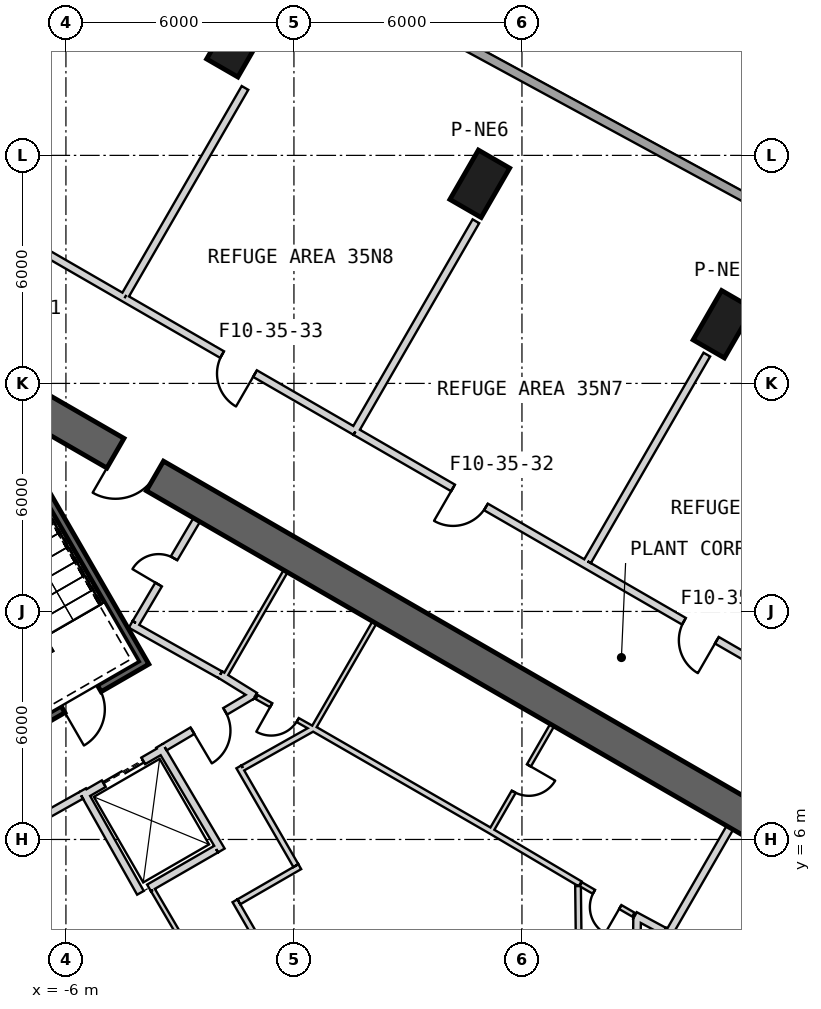
"""IFC4 building model, lengths in metres.
Left out: names, types, materials, properties, quantities, classifications, styles, units other than length and angle.
Written with IfcOpenShell. Run it as: python <this file> out.ifc"""

import sys

from ifc_helpers import new_model, si_unit, direction, frame, frame_2d, origin, origin_2d, place, context, subcontext, project, spatial, rectangle, extrude, element, fill, save


model = new_model("IFC4")
c1 = context("Model", 3, precision=1e-05, world=origin(), true_north=direction((0.0, 1.0)))
c2 = subcontext(c1, "Body", "Model", "MODEL_VIEW")
j1 = project(units=[si_unit("LENGTHUNIT", "METRE"), si_unit("PLANEANGLEUNIT", "RADIAN")], contexts=[c1])
p1 = place(None, origin())
s1 = spatial("IfcSite", under=j1, at=p1, CompositionType="ELEMENT")
p2 = place(p1, origin())
s2 = spatial("IfcBuilding", under=s1, at=p2, CompositionType="ELEMENT")
p3 = place(p2, frame((0.0, 0.0, 163.2)))
s3 = spatial("IfcBuildingStorey", under=s2, at=p3, CompositionType="ELEMENT", Elevation=163.2)
for number, where, z_axis, x_axis in (
    (1, (11.291, 19.557, 0.0), (0.0, 0.0, 1.0), (0.5, 0.866, 0.0)),
    (2, (4.89, 23.253, 0.0), (0.0, 0.0, 1.0), (0.5, 0.866, 0.0)),
    (3, (-1.511, 26.948, 0.0), (0.0, 0.0, 1.0), (0.5, 0.866, 0.0)),
):
    element("IfcColumn", number, at=place(p3, frame(where, z_axis=z_axis, x_axis=x_axis)), inside=s3, PredefinedType="COLUMN", context=c2, shape_type="SweptSolid", body=[
        extrude(rectangle(XDim=1.5, YDim=0.95, at=origin_2d()), origin(), (0.0, 0.0, 1.0), 5.7),
    ])
p4 = place(p3, frame((19.475, 2.208, 0.0), z_axis=(0.0, 0.0, 1.0), x_axis=(-0.866028369851, 0.499994862586, 0.0)))
e4 = element("IfcWall", 4, at=p4, inside=s3, PredefinedType="SHEAR", context=c2, shape_type="SweptSolid", body=[
    extrude(rectangle(XDim=31.523, YDim=0.9, at=frame_2d((15.762, 0.0))), origin(), (0.0, 0.0, 1.0), 6.0),
])
p5 = place(p4, frame((3.612, 0.0, 0.0)))
e5 = element("IfcOpeningElement", 5, at=p5, cuts=e4, PredefinedType="OPENING", context=c2, shape_type="SweptSolid", body=[
    extrude(rectangle(XDim=1.2, YDim=2.4, at=frame_2d((0.6, 1.2))), frame((0.0, 0.46, 0.0), z_axis=(0.0, -1.0, 0.0), x_axis=(1.0, 0.0, 0.0)), (0.0, 0.0, 1.0), 0.92),
])
p6 = place(p4, frame((26.712, 0.0, 0.0)))
e6 = element("IfcOpeningElement", 6, at=p6, cuts=e4, PredefinedType="OPENING", context=c2, shape_type="SweptSolid", body=[
    extrude(rectangle(XDim=1.2, YDim=2.4, at=frame_2d((0.6, 1.2))), frame((0.0, 0.46, 0.0), z_axis=(0.0, -1.0, 0.0), x_axis=(1.0, 0.0, 0.0)), (0.0, 0.0, 1.0), 0.92),
])
p7 = place(p3, frame((29.693, 13.206, 0.0), z_axis=(0.0, 0.0, 1.0), x_axis=(-0.878694903116, 0.477383773539, 0.0)))
e7 = element("IfcWall", 7, at=p7, inside=s3, PredefinedType="SOLIDWALL", context=c2, shape_type="SweptSolid", body=[
    extrude(rectangle(XDim=38.239, YDim=0.24, at=frame_2d((19.12, 0.0))), origin(), (0.0, 0.0, 1.0), 5.7),
])
p8 = place(p3, frame((9.847, 3.495, 0.0), z_axis=(0.0, 0.0, 1.0), x_axis=(0.499984717929, 0.866034226713, 0.0)))
e8 = element("IfcWall", 8, at=p8, inside=s3, PredefinedType="PLUMBINGWALL", context=c2, shape_type="SweptSolid", body=[
    extrude(rectangle(XDim=3.25, YDim=0.2, at=frame_2d((1.625, 0.0))), origin(), (0.0, 0.0, 1.0), 5.7),
])
p9 = place(p3, frame((12.073, 2.211, 0.0), z_axis=(0.0, 0.0, 1.0), x_axis=(-0.860414880418, 0.509594185166, 0.0)))
e9 = element("IfcWall", 9, at=p9, inside=s3, PredefinedType="PLUMBINGWALL", context=c2, shape_type="SweptSolid", body=[
    extrude(rectangle(XDim=2.7, YDim=0.2, at=frame_2d((1.35, 0.0))), origin(), (0.0, 0.0, 1.0), 5.7),
])
p10 = place(p3, frame((-7.854, 17.405, -0.35), z_axis=(0.0, 0.0, 1.0), x_axis=(0.499997992926, -0.866026562566, 0.0)))
e10 = element("IfcWall", 10, at=p10, inside=s3, PredefinedType="SHEAR", context=c2, shape_type="SweptSolid", body=[
    extrude(rectangle(XDim=7.9, YDim=0.2, at=frame_2d((3.95, 0.0))), origin(), (0.0, 0.0, 1.0), 6.05),
])
p11 = place(p3, frame((-7.159, 8.8, -0.35), z_axis=(0.0, 0.0, 1.0), x_axis=(0.866047807691, 0.499961193289, 0.0)))
e11 = element("IfcWall", 11, at=p11, inside=s3, PredefinedType="SHEAR", context=c2, shape_type="SweptSolid", body=[
    extrude(rectangle(XDim=3.6, YDim=0.2, at=frame_2d((1.8, 0.0))), origin(), (0.0, 0.0, 1.0), 6.05),
])
p12 = place(p11, frame((1.25, 0.0, 0.35)))
e12 = element("IfcOpeningElement", 12, at=p12, cuts=e11, PredefinedType="OPENING", context=c2, shape_type="SweptSolid", body=[
    extrude(rectangle(XDim=1.1, YDim=2.1, at=frame_2d((0.55, 1.05))), frame((0.0, 0.11, 0.0), z_axis=(0.0, -1.0, 0.0), x_axis=(1.0, 0.0, 0.0)), (0.0, 0.0, 1.0), 0.22),
])
p13 = place(p3, frame((-5.524, 7.168, 0.0), z_axis=(0.0, 0.0, 1.0), x_axis=(0.866024647952, 0.500001309137, 0.0)))
e13 = element("IfcWall", 13, at=p13, inside=s3, PredefinedType="PLUMBINGWALL", context=c2, shape_type="SweptSolid", body=[
    extrude(rectangle(XDim=2.4, YDim=0.2, at=frame_2d((1.2, 0.0))), origin(), (0.0, 0.0, 1.0), 5.7),
])
p14 = place(p13, frame((0.6, 0.0, 0.0)))
e14 = element("IfcOpeningElement", 14, at=p14, cuts=e13, PredefinedType="OPENING", context=c2, shape_type="SweptSolid", body=[
    extrude(rectangle(XDim=1.2, YDim=2.4, at=frame_2d((0.6, 1.2))), frame((0.0, 0.11, 0.0), z_axis=(0.0, -1.0, 0.0), x_axis=(1.0, 0.0, 0.0)), (0.0, 0.0, 1.0), 0.22),
])
p15 = place(p3, frame((-4.039, 4.596, 0.0), z_axis=(0.0, 0.0, 1.0), x_axis=(-0.491322718731, 0.870977603649, 0.0)))
e15 = element("IfcWall", 15, at=p15, inside=s3, PredefinedType="PLUMBINGWALL", context=c2, shape_type="SweptSolid", body=[
    extrude(rectangle(XDim=3.1, YDim=0.2, at=frame_2d((1.55, 0.0))), origin(), (0.0, 0.0, 1.0), 5.7),
])
p16 = place(p3, frame((-3.538, 8.465, 0.0), z_axis=(0.0, 0.0, 1.0), x_axis=(0.508616218331, -0.860993346345, 0.0)))
e16 = element("IfcWall", 16, at=p16, inside=s3, PredefinedType="PLUMBINGWALL", context=c2, shape_type="SweptSolid", body=[
    extrude(rectangle(XDim=3.2, YDim=0.2, at=frame_2d((1.6, 0.0))), origin(), (0.0, 0.0, 1.0), 5.7),
])
p17 = place(p3, frame((-2.047, 5.746, 0.0), z_axis=(0.0, 0.0, 1.0), x_axis=(-0.866032100247, -0.499988401207, 0.0)))
e17 = element("IfcWall", 17, at=p17, inside=s3, PredefinedType="PLUMBINGWALL", context=c2, shape_type="SweptSolid", body=[
    extrude(rectangle(XDim=2.04, YDim=0.2, at=frame_2d((1.02, 0.0))), origin(), (0.0, 0.0, 1.0), 5.7),
])
p18 = place(p3, frame((6.795, 9.01, 0.0), z_axis=(0.0, 0.0, 1.0), x_axis=(-0.499984717929, -0.866034226713, 0.0)))
e18 = element("IfcWall", 18, at=p18, inside=s3, PredefinedType="PARTITIONING", context=c2, shape_type="SweptSolid", body=[
    extrude(rectangle(XDim=3.25, YDim=0.12, at=frame_2d((1.625, 0.0))), origin(), (0.0, 0.0, 1.0), 5.7),
])
p19 = place(p18, frame((1.225, 0.0, 0.0)))
e19 = element("IfcOpeningElement", 19, at=p19, cuts=e18, PredefinedType="OPENING", context=c2, shape_type="SweptSolid", body=[
    extrude(rectangle(XDim=0.8, YDim=2.1, at=frame_2d((0.4, 1.05))), frame((0.0, 0.07, 0.0), z_axis=(0.0, -1.0, 0.0), x_axis=(1.0, 0.0, 0.0)), (0.0, 0.0, 1.0), 0.14),
])
p20 = place(p3, frame((8.974, 3.999, 0.0), z_axis=(0.0, 0.0, 1.0), x_axis=(0.880917147855, -0.473270513147, 0.0)))
e20 = element("IfcWall", 20, at=p20, inside=s3, PredefinedType="PARTITIONING", context=c2, shape_type="SweptSolid", body=[
    extrude(rectangle(XDim=0.878, YDim=0.2, at=frame_2d((0.439, 0.0))), origin(), (0.0, 0.0, 1.0), 5.7),
])
p21 = place(p3, frame((7.53, 4.833, 0.0), z_axis=(0.0, 0.0, 1.0), x_axis=(-0.860550523279, 0.509365091938, 0.0)))
e21 = element("IfcWall", 21, at=p21, inside=s3, PredefinedType="PLUMBINGWALL", context=c2, shape_type="SweptSolid", body=[
    extrude(rectangle(XDim=2.755, YDim=0.15, at=frame_2d((1.377, 0.0))), origin(), (0.0, 0.0, 1.0), 5.7),
])
p22 = place(p3, frame((7.55, 4.821, 0.0), z_axis=(0.0, 0.0, 1.0), x_axis=(0.866019818373, -0.500009674092, 0.0)))
e22 = element("IfcWall", 22, at=p22, inside=s3, PredefinedType="PARTITIONING", context=c2, shape_type="SweptSolid", body=[
    extrude(rectangle(XDim=1.594, YDim=0.12, at=frame_2d((0.797, 0.0))), origin(), (0.0, 0.0, 1.0), 5.7),
])
p23 = place(p22, frame((0.397, 0.0, 0.0)))
e23 = element("IfcOpeningElement", 23, at=p23, cuts=e22, PredefinedType="OPENING", context=c2, shape_type="SweptSolid", body=[
    extrude(rectangle(XDim=0.8, YDim=2.1, at=frame_2d((0.4, 1.05))), frame((0.0, 0.07, 0.0), z_axis=(0.0, -1.0, 0.0), x_axis=(1.0, 0.0, 0.0)), (0.0, 0.0, 1.0), 0.14),
])
p24 = place(p3, frame((2.119, 11.709, 0.0), z_axis=(0.0, 0.0, 1.0), x_axis=(-0.500017246033, -0.866015446554, 0.0)))
e24 = element("IfcWall", 24, at=p24, inside=s3, PredefinedType="PARTITIONING", context=c2, shape_type="SweptSolid", body=[
    extrude(rectangle(XDim=3.25, YDim=0.12, at=frame_2d((1.625, 0.0))), origin(), (0.0, 0.0, 1.0), 5.7),
])
p25 = place(p3, frame((5.159, 6.236, 0.0), z_axis=(0.0, 0.0, 1.0), x_axis=(-0.866028230842, 0.499995103361, 0.0)))
e25 = element("IfcWall", 25, at=p25, inside=s3, PredefinedType="PLUMBINGWALL", context=c2, shape_type="SweptSolid", body=[
    extrude(rectangle(XDim=5.4, YDim=0.15, at=frame_2d((2.7, 0.0))), origin(), (0.0, 0.0, 1.0), 5.7),
])
p26 = place(p3, frame((-0.22, 13.06, 0.0), z_axis=(0.0, 0.0, 1.0), x_axis=(-0.499984717929, -0.866034226713, 0.0)))
e26 = element("IfcWall", 26, at=p26, inside=s3, PredefinedType="PARTITIONING", context=c2, shape_type="SweptSolid", body=[
    extrude(rectangle(XDim=3.25, YDim=0.12, at=frame_2d((1.625, 0.0))), origin(), (0.0, 0.0, 1.0), 5.7),
])
p27 = place(p3, frame((-1.941, 10.339, 0.0), z_axis=(0.0, 0.0, 1.0), x_axis=(0.850216889117, -0.526432561171, 0.0)))
e27 = element("IfcWall", 27, at=p27, inside=s3, PredefinedType="PARTITIONING", context=c2, shape_type="SweptSolid", body=[
    extrude(rectangle(XDim=1.078, YDim=0.2, at=frame_2d((0.539, 0.0))), origin(), (0.0, 0.0, 1.0), 5.7),
])
p28 = place(p3, frame((-0.979, 9.747, 0.0), z_axis=(0.0, 0.0, 1.0), x_axis=(0.871957532922, -0.489581515972, 0.0)))
e28 = element("IfcWall", 28, at=p28, inside=s3, PredefinedType="PARTITIONING", context=c2, shape_type="SweptSolid", body=[
    extrude(rectangle(XDim=1.672, YDim=0.12, at=frame_2d((0.836, 0.0))), origin(), (0.0, 0.0, 1.0), 5.7),
])
p29 = place(p28, frame((0.436, 0.0, 0.0)))
e29 = element("IfcOpeningElement", 29, at=p29, cuts=e28, PredefinedType="OPENING", context=c2, shape_type="SweptSolid", body=[
    extrude(rectangle(XDim=0.8, YDim=2.1, at=frame_2d((0.4, 1.05))), frame((0.0, 0.07, 0.0), z_axis=(0.0, -1.0, 0.0), x_axis=(1.0, 0.0, 0.0)), (0.0, 0.0, 1.0), 0.14),
])
p30 = place(p3, frame((-4.296, 11.659, 0.0), z_axis=(0.0, 0.0, 1.0), x_axis=(0.871534483978, -0.490334215854, 0.0)))
e30 = element("IfcWall", 30, at=p30, inside=s3, PredefinedType="PARTITIONING", context=c2, shape_type="SweptSolid", body=[
    extrude(rectangle(XDim=2.7, YDim=0.2, at=frame_2d((1.35, 0.0))), origin(), (0.0, 0.0, 1.0), 5.7),
])
p31 = place(p3, frame((-2.558, 14.409, 0.0), z_axis=(0.0, 0.0, 1.0), x_axis=(-0.508018930956, -0.861345903683, 0.0)))
e31 = element("IfcWall", 31, at=p31, inside=s3, PredefinedType="PARTITIONING", context=c2, shape_type="SweptSolid", body=[
    extrude(rectangle(XDim=3.15, YDim=0.2, at=frame_2d((1.575, 0.0))), origin(), (0.0, 0.0, 1.0), 5.7),
])
p32 = place(p31, frame((1.175, 0.0, 0.0)))
e32 = element("IfcOpeningElement", 32, at=p32, cuts=e31, PredefinedType="OPENING", context=c2, shape_type="SweptSolid", body=[
    extrude(rectangle(XDim=0.8, YDim=2.1, at=frame_2d((0.4, 1.05))), frame((0.0, 0.11, 0.0), z_axis=(0.0, -1.0, 0.0), x_axis=(1.0, 0.0, 0.0)), (0.0, 0.0, 1.0), 0.22),
])
p33 = place(p3, frame((9.001, 1.27, 0.0), z_axis=(0.0, 0.0, 1.0), x_axis=(0.010723968736, 0.999942496594, 0.0)))
e33 = element("IfcWall", 33, at=p33, inside=s3, PredefinedType="PARTITIONING", context=c2, shape_type="SweptSolid", body=[
    extrude(rectangle(XDim=2.709, YDim=0.2, at=frame_2d((1.354, 0.0))), origin(), (0.0, 0.0, 1.0), 5.7),
])
p34 = place(p33, frame((0.848, 0.0, 0.0)))
e34 = element("IfcOpeningElement", 34, at=p34, cuts=e33, PredefinedType="OPENING", context=c2, shape_type="SweptSolid", body=[
    extrude(rectangle(XDim=1.0, YDim=2.1, at=frame_2d((0.5, 1.05))), frame((0.0, 0.11, 0.0), z_axis=(0.0, -1.0, 0.0), x_axis=(1.0, 0.0, 0.0)), (0.0, 0.0, 1.0), 0.22),
])
p35 = place(p3, frame((-5.6, 7.16, 0.0), z_axis=(0.0, 0.0, 1.0), x_axis=(-0.871340486379, -0.490678873396, 0.0)))
e35 = element("IfcWall", 35, at=p35, inside=s3, PredefinedType="PARTITIONING", context=c2, shape_type="SweptSolid", body=[
    extrude(rectangle(XDim=2.581, YDim=0.2, at=frame_2d((1.291, 0.0))), origin(), (0.0, 0.0, 1.0), 5.7),
])
p36 = place(p3, frame((-1.07, 9.809, 0.0), z_axis=(0.0, 0.0, 1.0), x_axis=(-0.860603293832, -0.509275927808, 0.0)))
e36 = element("IfcWall", 36, at=p36, inside=s3, PredefinedType="PARTITIONING", context=c2, shape_type="SweptSolid", body=[
    extrude(rectangle(XDim=2.708, YDim=0.2, at=frame_2d((1.354, 0.0))), origin(), (0.0, 0.0, 1.0), 5.7),
])
p37 = place(p36, frame((0.86, 0.0, 0.0)))
e37 = element("IfcOpeningElement", 37, at=p37, cuts=e36, PredefinedType="OPENING", context=c2, shape_type="SweptSolid", body=[
    extrude(rectangle(XDim=1.0, YDim=2.1, at=frame_2d((0.5, 1.05))), frame((0.0, 0.11, 0.0), z_axis=(0.0, -1.0, 0.0), x_axis=(1.0, 0.0, 0.0)), (0.0, 0.0, 1.0), 0.22),
])
p38 = place(p3, frame((-1.42, 0.762, 0.0), z_axis=(0.0, 0.0, 1.0), x_axis=(-0.505655878767, 0.862735261983, 0.0)))
e38 = element("IfcWall", 38, at=p38, inside=s3, PredefinedType="PARTITIONING", context=c2, shape_type="SweptSolid", body=[
    extrude(rectangle(XDim=4.53, YDim=0.12, at=frame_2d((2.265, 0.0))), origin(), (0.0, 0.0, 1.0), 5.7),
])
p39 = place(p38, frame((1.916, 0.0, 0.0)))
e39 = element("IfcOpeningElement", 39, at=p39, cuts=e38, PredefinedType="OPENING", context=c2, shape_type="SweptSolid", body=[
    extrude(rectangle(XDim=0.8, YDim=2.1, at=frame_2d((0.4, 1.05))), frame((0.0, 0.07, 0.0), z_axis=(0.0, -1.0, 0.0), x_axis=(1.0, 0.0, 0.0)), (0.0, 0.0, 1.0), 0.14),
])
p40 = place(p3, frame((7.501, 2.625, 0.0), z_axis=(0.0, 0.0, 1.0), x_axis=(-0.011799927307, 0.999930378434, 0.0)))
e40 = element("IfcWall", 40, at=p40, inside=s3, PredefinedType="PLUMBINGWALL", context=c2, shape_type="SweptSolid", body=[
    extrude(rectangle(XDim=2.152, YDim=0.15, at=frame_2d((1.076, 0.0))), origin(), (0.0, 0.0, 1.0), 5.7),
])
p41 = place(p3, frame((-1.551, 4.387, 0.0), z_axis=(0.0, 0.0, 1.0), x_axis=(0.499976393034, -0.866039032844, 0.0)))
e41 = element("IfcWall", 41, at=p41, inside=s3, PredefinedType="PLUMBINGWALL", context=c2, shape_type="SweptSolid", body=[
    extrude(rectangle(XDim=3.079, YDim=0.15, at=frame_2d((1.54, 0.0))), origin(), (0.0, 0.0, 1.0), 5.7),
])
p42 = place(p41, frame((1.177, 0.0, 0.0)))
e42 = element("IfcOpeningElement", 42, at=p42, cuts=e41, PredefinedType="OPENING", context=c2, shape_type="SweptSolid", body=[
    extrude(rectangle(XDim=0.8, YDim=2.1, at=frame_2d((0.4, 1.05))), frame((0.0, 0.085, 0.0), z_axis=(0.0, -1.0, 0.0), x_axis=(1.0, 0.0, 0.0)), (0.0, 0.0, 1.0), 0.17),
])
p43 = place(p3, frame((0.153, 5.285, 0.0), z_axis=(0.0, 0.0, 1.0), x_axis=(-0.866033964044, -0.499985172903, 0.0)))
e43 = element("IfcWall", 43, at=p43, inside=s3, PredefinedType="PLUMBINGWALL", context=c2, shape_type="SweptSolid", body=[
    extrude(rectangle(XDim=1.85, YDim=0.15, at=frame_2d((0.925, 0.0))), origin(), (0.0, 0.0, 1.0), 5.7),
])
p44 = place(p3, frame((-1.449, 7.91, 0.0), z_axis=(0.0, 0.0, 1.0), x_axis=(0.499990139034, -0.866031096941, 0.0)))
e44 = element("IfcWall", 44, at=p44, inside=s3, PredefinedType="PLUMBINGWALL", context=c2, shape_type="SweptSolid", body=[
    extrude(rectangle(XDim=3.0, YDim=0.15, at=frame_2d((1.5, 0.0))), origin(), (0.0, 0.0, 1.0), 5.7),
])
p45 = place(p3, frame((0.475, 8.905, 0.0), z_axis=(0.0, 0.0, 1.0), x_axis=(-0.871843752163, -0.489784107353, 0.0)))
e45 = element("IfcWall", 45, at=p45, inside=s3, PredefinedType="PLUMBINGWALL", context=c2, shape_type="SweptSolid", body=[
    extrude(rectangle(XDim=2.09, YDim=0.15, at=frame_2d((1.045, 0.0))), origin(), (0.0, 0.0, 1.0), 5.7),
])
p46 = place(p3, frame((13.77, 9.717, 0.0), z_axis=(0.0, 0.0, 1.0), x_axis=(-0.866024793964, 0.500001056239, 0.0)))
e46 = element("IfcWall", 46, at=p46, inside=s3, PredefinedType="PARTITIONING", context=c2, shape_type="SweptSolid", body=[
    extrude(rectangle(XDim=14.033, YDim=0.2, at=frame_2d((7.017, 0.0))), origin(), (0.0, 0.0, 1.0), 4.98),
])
p47 = place(p46, frame((3.05, 0.0, 0.0)))
e47 = element("IfcOpeningElement", 47, at=p47, cuts=e46, PredefinedType="OPENING", context=c2, shape_type="SweptSolid", body=[
    extrude(rectangle(XDim=1.0, YDim=2.1, at=frame_2d((0.5, 1.05))), frame((0.0, 0.11, 0.0), z_axis=(0.0, -1.0, 0.0), x_axis=(1.0, 0.0, 0.0)), (0.0, 0.0, 1.0), 0.22),
])
p48 = place(p46, frame((10.067, 0.0, 0.0)))
e48 = element("IfcOpeningElement", 48, at=p48, cuts=e46, PredefinedType="OPENING", context=c2, shape_type="SweptSolid", body=[
    extrude(rectangle(XDim=1.0, YDim=2.1, at=frame_2d((0.5, 1.05))), frame((0.0, 0.11, 0.0), z_axis=(0.0, -1.0, 0.0), x_axis=(1.0, 0.0, 0.0)), (0.0, 0.0, 1.0), 0.22),
])
p49 = place(p3, frame((1.617, 16.733, 0.0), z_axis=(0.0, 0.0, 1.0), x_axis=(-0.866020444499, 0.500008589636, 0.0)))
e49 = element("IfcWall", 49, at=p49, inside=s3, PredefinedType="PARTITIONING", context=c2, shape_type="SweptSolid", body=[
    extrude(rectangle(XDim=7.017, YDim=0.2, at=frame_2d((3.508, 0.0))), origin(), (0.0, 0.0, 1.0), 4.98),
])
p50 = place(p49, frame((3.05, 0.0, 0.0)))
e50 = element("IfcOpeningElement", 50, at=p50, cuts=e49, PredefinedType="OPENING", context=c2, shape_type="SweptSolid", body=[
    extrude(rectangle(XDim=1.0, YDim=2.1, at=frame_2d((0.5, 1.05))), frame((0.0, 0.11, 0.0), z_axis=(0.0, -1.0, 0.0), x_axis=(1.0, 0.0, 0.0)), (0.0, 0.0, 1.0), 0.22),
])
p51 = place(p3, frame((-4.46, 20.242, 0.0), z_axis=(0.0, 0.0, 1.0), x_axis=(-0.866008748622, 0.500028846479, 0.0)))
e51 = element("IfcWall", 51, at=p51, inside=s3, PredefinedType="PARTITIONING", context=c2, shape_type="SweptSolid", body=[
    extrude(rectangle(XDim=2.322, YDim=0.2, at=frame_2d((1.161, 0.0))), origin(), (0.0, 0.0, 1.0), 4.88),
])
p52 = place(p3, frame((10.865, 18.758, 0.0), z_axis=(0.0, 0.0, 1.0), x_axis=(-0.499987288472, -0.866032742664, 0.0)))
e52 = element("IfcWall", 52, at=p52, inside=s3, PredefinedType="PARTITIONING", context=c2, shape_type="SweptSolid", body=[
    extrude(rectangle(XDim=6.278, YDim=0.2, at=frame_2d((3.139, 0.0))), origin(), (0.0, 0.0, 1.0), 5.07),
])
for number, where, z_axis, x_axis in (
    (53, (1.649, 16.83, 0.0), (0.0, 0.0, 1.0), (0.5, 0.866, 0.0)),
    (54, (-4.427, 20.338, 0.0), (0.0, 0.0, 1.0), (0.5, 0.866, 0.0)),
):
    element("IfcWall", number, at=place(p3, frame(where, z_axis=z_axis, x_axis=x_axis)), inside=s3, PredefinedType="PARTITIONING", context=c2, shape_type="SweptSolid", body=[
        extrude(rectangle(XDim=6.278, YDim=0.2, at=frame_2d((3.139, 0.0))), origin(), (0.0, 0.0, 1.0), 4.98),
    ])
p53 = place(p12, origin())
e55 = element("IfcDoor", 55, at=p53, inside=s3, OperationType="SINGLE_SWING_LEFT", PredefinedType="USERDEFINED", context=c2, shape_type="SweptSolid", body=[
    extrude(rectangle(XDim=1.1, YDim=2.1, at=frame_2d((0.55, 1.05))), frame((0.0, 0.025, 0.0), z_axis=(0.0, -1.0, 0.0), x_axis=(1.0, 0.0, 0.0)), (0.0, 0.0, 1.0), 0.05),
])
fill(e12, e55)
p54 = place(p37, origin())
e56 = element("IfcDoor", 56, at=p54, inside=s3, OperationType="SINGLE_SWING_RIGHT", PredefinedType="USERDEFINED", context=c2, shape_type="SweptSolid", body=[
    extrude(rectangle(XDim=1.0, YDim=2.1, at=frame_2d((0.5, 1.05))), frame((0.0, 0.025, 0.0), z_axis=(0.0, -1.0, 0.0), x_axis=(1.0, 0.0, 0.0)), (0.0, 0.0, 1.0), 0.05),
])
fill(e37, e56)
p55 = place(p14, origin())
e57 = element("IfcDoor", 57, at=p55, inside=s3, OperationType="SLIDING_TO_LEFT", PredefinedType="USERDEFINED", context=c2, shape_type="SweptSolid", body=[
    extrude(rectangle(XDim=1.2, YDim=2.4, at=frame_2d((0.6, 1.2))), frame((0.0, 0.025, 0.0), z_axis=(0.0, -1.0, 0.0), x_axis=(1.0, 0.0, 0.0)), (0.0, 0.0, 1.0), 0.05),
])
fill(e14, e57)
p56 = place(p23, origin())
e58 = element("IfcDoor", 58, at=p56, inside=s3, OperationType="SINGLE_SWING_RIGHT", PredefinedType="USERDEFINED", context=c2, shape_type="SweptSolid", body=[
    extrude(rectangle(XDim=0.8, YDim=2.1, at=frame_2d((0.4, 1.05))), frame((0.0, 0.025, 0.0), z_axis=(0.0, -1.0, 0.0), x_axis=(1.0, 0.0, 0.0)), (0.0, 0.0, 1.0), 0.05),
])
fill(e23, e58)
p57 = place(p19, origin())
e59 = element("IfcDoor", 59, at=p57, inside=s3, OperationType="SINGLE_SWING_LEFT", PredefinedType="USERDEFINED", context=c2, shape_type="SweptSolid", body=[
    extrude(rectangle(XDim=0.8, YDim=2.1, at=frame_2d((0.4, 1.05))), frame((0.0, 0.025, 0.0), z_axis=(0.0, -1.0, 0.0), x_axis=(1.0, 0.0, 0.0)), (0.0, 0.0, 1.0), 0.05),
])
fill(e19, e59)
p58 = place(p29, origin())
e60 = element("IfcDoor", 60, at=p58, inside=s3, OperationType="SINGLE_SWING_LEFT", PredefinedType="USERDEFINED", context=c2, shape_type="SweptSolid", body=[
    extrude(rectangle(XDim=0.8, YDim=2.1, at=frame_2d((0.4, 1.05))), frame((0.0, 0.025, 0.0), z_axis=(0.0, -1.0, 0.0), x_axis=(1.0, 0.0, 0.0)), (0.0, 0.0, 1.0), 0.05),
])
fill(e29, e60)
p59 = place(p32, origin())
e61 = element("IfcDoor", 61, at=p59, inside=s3, OperationType="SINGLE_SWING_RIGHT", PredefinedType="USERDEFINED", context=c2, shape_type="SweptSolid", body=[
    extrude(rectangle(XDim=0.8, YDim=2.1, at=frame_2d((0.4, 1.05))), frame((0.0, 0.025, 0.0), z_axis=(0.0, -1.0, 0.0), x_axis=(1.0, 0.0, 0.0)), (0.0, 0.0, 1.0), 0.05),
])
fill(e32, e61)
p60 = place(p47, origin())
e62 = element("IfcDoor", 62, at=p60, inside=s3, OperationType="SINGLE_SWING_LEFT", PredefinedType="USERDEFINED", context=c2, shape_type="SweptSolid", body=[
    extrude(rectangle(XDim=1.0, YDim=2.1, at=frame_2d((0.5, 1.05))), frame((0.0, 0.025, 0.0), z_axis=(0.0, -1.0, 0.0), x_axis=(1.0, 0.0, 0.0)), (0.0, 0.0, 1.0), 0.05),
])
fill(e47, e62)
p61 = place(p48, origin())
e63 = element("IfcDoor", 63, at=p61, inside=s3, OperationType="SINGLE_SWING_RIGHT", PredefinedType="USERDEFINED", context=c2, shape_type="SweptSolid", body=[
    extrude(rectangle(XDim=1.0, YDim=2.1, at=frame_2d((0.5, 1.05))), frame((0.0, 0.025, 0.0), z_axis=(0.0, -1.0, 0.0), x_axis=(1.0, 0.0, 0.0)), (0.0, 0.0, 1.0), 0.05),
])
fill(e48, e63)
p62 = place(p50, origin())
e64 = element("IfcDoor", 64, at=p62, inside=s3, OperationType="SINGLE_SWING_LEFT", PredefinedType="USERDEFINED", context=c2, shape_type="SweptSolid", body=[
    extrude(rectangle(XDim=1.0, YDim=2.1, at=frame_2d((0.5, 1.05))), frame((0.0, 0.025, 0.0), z_axis=(0.0, -1.0, 0.0), x_axis=(1.0, 0.0, 0.0)), (0.0, 0.0, 1.0), 0.05),
])
fill(e50, e64)
p63 = place(p6, origin())
e65 = element("IfcDoor", 65, at=p63, inside=s3, OperationType="SINGLE_SWING_RIGHT", PredefinedType="USERDEFINED", context=c2, shape_type="SweptSolid", body=[
    extrude(rectangle(XDim=1.2, YDim=2.4, at=frame_2d((0.6, 1.2))), frame((0.0, 0.025, 0.0), z_axis=(0.0, -1.0, 0.0), x_axis=(1.0, 0.0, 0.0)), (0.0, 0.0, 1.0), 0.05),
])
fill(e6, e65)
save(model, sys.argv[1])
